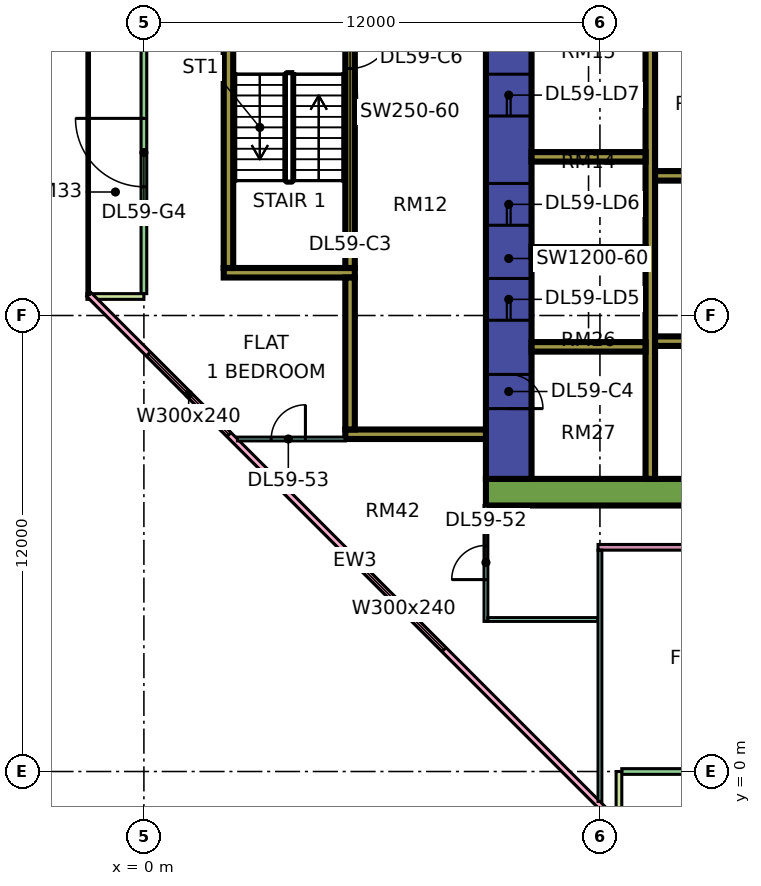
"""IFC4 building model, lengths in metres.
Left out: names, types, materials, properties, quantities, classifications, styles, units other than length and angle.
Written with IfcOpenShell. Run it as: python <this file> out.ifc"""

import sys

from ifc_helpers import new_model, si_unit, direction, frame, frame_2d, origin, place, context, subcontext, project, spatial, rectangle, extrude, element, fill, save


model = new_model("IFC4")
c1 = context("Model", 3, precision=1e-05, world=origin(), true_north=direction((0.0, 1.0)))
c2 = subcontext(c1, "Body", "Model", "MODEL_VIEW")
j1 = project(units=[si_unit("LENGTHUNIT", "METRE"), si_unit("PLANEANGLEUNIT", "RADIAN")], contexts=[c1])
p1 = place(None, origin())
s1 = spatial("IfcSite", under=j1, at=p1, CompositionType="ELEMENT")
p2 = place(p1, origin())
s2 = spatial("IfcBuilding", under=s1, at=p2, CompositionType="ELEMENT")
p3 = place(p2, frame((0.0, 0.0, 249.15)))
s3 = spatial("IfcBuildingStorey", under=s2, at=p3, CompositionType="ELEMENT", Elevation=249.15)
p4 = place(p3, frame((9.0, 7.35, 0.0), z_axis=(0.0, 0.0, 1.0), x_axis=(1.0, 0.0, 0.0)))
e1 = element("IfcWall", 1, at=p4, inside=s3, PredefinedType="SHEAR", context=c2, shape_type="SweptSolid", body=[
    extrude(rectangle(XDim=25.0, YDim=0.7, at=frame_2d((12.5, 0.0))), origin(), (0.0, 0.0, 1.0), 3.75),
])
p5 = place(p3, frame((9.6, 7.7, 0.0), z_axis=(0.0, 0.0, 1.0), x_axis=(0.0, 1.0, 0.0)))
e2 = element("IfcWall", 2, at=p5, inside=s3, PredefinedType="SHEAR", context=c2, shape_type="SweptSolid", body=[
    extrude(rectangle(XDim=11.6, YDim=1.2, at=frame_2d((5.8, 0.0))), origin(), (0.0, 0.0, 1.0), 3.75),
])
p6 = place(p5, frame((4.175, 0.0, 0.0)))
e3 = element("IfcOpeningElement", 3, at=p6, cuts=e2, PredefinedType="OPENING", context=c2, shape_type="SweptSolid", body=[
    extrude(rectangle(XDim=1.1, YDim=2.2, at=frame_2d((0.55, 1.1))), frame((0.0, 0.61, 0.0), z_axis=(0.0, -1.0, 0.0), x_axis=(1.0, 0.0, 0.0)), (0.0, 0.0, 1.0), 1.22),
])
p7 = place(p5, frame((6.675, 0.0, 0.0)))
e4 = element("IfcOpeningElement", 4, at=p7, cuts=e2, PredefinedType="OPENING", context=c2, shape_type="SweptSolid", body=[
    extrude(rectangle(XDim=1.1, YDim=2.2, at=frame_2d((0.55, 1.1))), frame((0.0, 0.61, 0.0), z_axis=(0.0, -1.0, 0.0), x_axis=(1.0, 0.0, 0.0)), (0.0, 0.0, 1.0), 1.22),
])
p8 = place(p5, frame((9.55, 0.0, 0.0)))
e5 = element("IfcOpeningElement", 5, at=p8, cuts=e2, PredefinedType="OPENING", context=c2, shape_type="SweptSolid", body=[
    extrude(rectangle(XDim=1.1, YDim=2.2, at=frame_2d((0.55, 1.1))), frame((0.0, 0.61, 0.0), z_axis=(0.0, -1.0, 0.0), x_axis=(1.0, 0.0, 0.0)), (0.0, 0.0, 1.0), 1.22),
])
p9 = place(p5, frame((1.85, 0.0, 0.0)))
e6 = element("IfcOpeningElement", 6, at=p9, cuts=e2, PredefinedType="OPENING", context=c2, shape_type="SweptSolid", body=[
    extrude(rectangle(XDim=0.9, YDim=2.1, at=frame_2d((0.45, 1.05))), frame((0.0, 0.61, 0.0), z_axis=(0.0, -1.0, 0.0), x_axis=(1.0, 0.0, 0.0)), (0.0, 0.0, 1.0), 1.22),
])
p10 = place(p3, frame((13.325, 7.7, 0.0), z_axis=(0.0, 0.0, 1.0), x_axis=(0.0, 1.0, 0.0)))
e7 = element("IfcWall", 7, at=p10, inside=s3, PredefinedType="SHEAR", context=c2, shape_type="SweptSolid", body=[
    extrude(rectangle(XDim=11.6, YDim=0.25, at=frame_2d((5.8, 0.0))), origin(), (0.0, 0.0, 1.0), 3.75),
])
p11 = place(p3, frame((13.45, 11.325, 0.0), z_axis=(0.0, 0.0, 1.0), x_axis=(1.0, 0.0, 0.0)))
e8 = element("IfcWall", 8, at=p11, inside=s3, PredefinedType="SHEAR", context=c2, shape_type="SweptSolid", body=[
    extrude(rectangle(XDim=19.85, YDim=0.25, at=frame_2d((9.925, 0.0))), origin(), (0.0, 0.0, 1.0), 3.75),
])
p12 = place(p11, frame((11.65, 0.0, 0.0)))
e9 = element("IfcOpeningElement", 9, at=p12, cuts=e8, PredefinedType="OPENING", context=c2, shape_type="SweptSolid", body=[
    extrude(rectangle(XDim=1.2, YDim=2.2, at=frame_2d((0.6, 1.1))), frame((0.0, 0.135, 0.0), z_axis=(0.0, -1.0, 0.0), x_axis=(1.0, 0.0, 0.0)), (0.0, 0.0, 1.0), 0.27),
])
p13 = place(p11, frame((14.4, 0.0, 0.0)))
e10 = element("IfcOpeningElement", 10, at=p13, cuts=e8, PredefinedType="OPENING", context=c2, shape_type="SweptSolid", body=[
    extrude(rectangle(XDim=1.2, YDim=2.2, at=frame_2d((0.6, 1.1))), frame((0.0, 0.135, 0.0), z_axis=(0.0, -1.0, 0.0), x_axis=(1.0, 0.0, 0.0)), (0.0, 0.0, 1.0), 0.27),
])
p14 = place(p11, frame((17.15, 0.0, 0.0)))
e11 = element("IfcOpeningElement", 11, at=p14, cuts=e8, PredefinedType="OPENING", context=c2, shape_type="SweptSolid", body=[
    extrude(rectangle(XDim=1.2, YDim=2.2, at=frame_2d((0.6, 1.1))), frame((0.0, 0.135, 0.0), z_axis=(0.0, -1.0, 0.0), x_axis=(1.0, 0.0, 0.0)), (0.0, 0.0, 1.0), 0.27),
])
p15 = place(p11, frame((2.8, 0.0, 0.0)))
e12 = element("IfcOpeningElement", 12, at=p15, cuts=e8, PredefinedType="OPENING", context=c2, shape_type="SweptSolid", body=[
    extrude(rectangle(XDim=0.9, YDim=2.1, at=frame_2d((0.45, 1.05))), frame((0.0, 0.135, 0.0), z_axis=(0.0, -1.0, 0.0), x_axis=(1.0, 0.0, 0.0)), (0.0, 0.0, 1.0), 0.27),
])
p16 = place(p11, frame((8.175, 0.0, 0.0)))
e13 = element("IfcOpeningElement", 13, at=p16, cuts=e8, PredefinedType="OPENING", context=c2, shape_type="SweptSolid", body=[
    extrude(rectangle(XDim=0.9, YDim=2.1, at=frame_2d((0.45, 1.05))), frame((0.0, 0.135, 0.0), z_axis=(0.0, -1.0, 0.0), x_axis=(1.0, 0.0, 0.0)), (0.0, 0.0, 1.0), 0.27),
])
p17 = place(p3, frame((13.45, 15.675, 0.0), z_axis=(0.0, 0.0, 1.0), x_axis=(1.0, 0.0, 0.0)))
e14 = element("IfcWall", 14, at=p17, inside=s3, PredefinedType="SHEAR", context=c2, shape_type="SweptSolid", body=[
    extrude(rectangle(XDim=13.75, YDim=0.25, at=frame_2d((6.875, 0.0))), origin(), (0.0, 0.0, 1.0), 3.75),
])
p18 = place(p17, frame((11.65, 0.0, 0.0)))
e15 = element("IfcOpeningElement", 15, at=p18, cuts=e14, PredefinedType="OPENING", context=c2, shape_type="SweptSolid", body=[
    extrude(rectangle(XDim=1.2, YDim=2.2, at=frame_2d((0.6, 1.1))), frame((0.0, 0.135, 0.0), z_axis=(0.0, -1.0, 0.0), x_axis=(1.0, 0.0, 0.0)), (0.0, 0.0, 1.0), 0.27),
])
for number, where, z_axis, x_axis in (
    (16, (10.2, 11.175, 0.0), (0.0, 0.0, 1.0), (1.0, 0.0, 0.0)),
    (17, (10.2, 13.675, 0.0), (0.0, 0.0, 1.0), (1.0, 0.0, 0.0)),
    (18, (10.2, 16.175, 0.0), (0.0, 0.0, 1.0), (1.0, 0.0, 0.0)),
):
    element("IfcWall", number, at=place(p3, frame(where, z_axis=z_axis, x_axis=x_axis)), inside=s3, PredefinedType="SHEAR", context=c2, shape_type="SweptSolid", body=[
        extrude(rectangle(XDim=3.0, YDim=0.25, at=frame_2d((1.5, 0.0))), origin(), (0.0, 0.0, 1.0), 3.75),
    ])
p19 = place(p3, frame((2.1, 13.125, 0.0), z_axis=(0.0, 0.0, 1.0), x_axis=(1.0, 0.0, 0.0)))
e19 = element("IfcWall", 19, at=p19, inside=s3, PredefinedType="SHEAR", context=c2, shape_type="SweptSolid", body=[
    extrude(rectangle(XDim=3.45, YDim=0.25, at=frame_2d((1.725, 0.0))), origin(), (0.0, 0.0, 1.0), 3.75),
])
p20 = place(p3, frame((2.225, 13.25, 0.0), z_axis=(0.0, 0.0, 1.0), x_axis=(0.0, 1.0, 0.0)))
e20 = element("IfcWall", 20, at=p20, inside=s3, PredefinedType="SHEAR", context=c2, shape_type="SweptSolid", body=[
    extrude(rectangle(XDim=6.5, YDim=0.25, at=frame_2d((3.25, 0.0))), origin(), (0.0, 0.0, 1.0), 3.75),
])
p21 = place(p3, frame((5.425, 13.25, 0.0), z_axis=(0.0, 0.0, 1.0), x_axis=(0.0, 1.0, 0.0)))
e21 = element("IfcWall", 21, at=p21, inside=s3, PredefinedType="SHEAR", context=c2, shape_type="SweptSolid", body=[
    extrude(rectangle(XDim=6.5, YDim=0.25, at=frame_2d((3.25, 0.0))), origin(), (0.0, 0.0, 1.0), 3.75),
])
p22 = place(p21, frame((5.25, 0.0, 0.0)))
e22 = element("IfcOpeningElement", 22, at=p22, cuts=e21, PredefinedType="OPENING", context=c2, shape_type="SweptSolid", body=[
    extrude(rectangle(XDim=1.1, YDim=2.2, at=frame_2d((0.55, 1.1))), frame((0.0, 0.135, 0.0), z_axis=(0.0, -1.0, 0.0), x_axis=(1.0, 0.0, 0.0)), (0.0, 0.0, 1.0), 0.27),
])
p23 = place(p3, frame((5.3, 8.875, 0.0), z_axis=(0.0, 0.0, 1.0), x_axis=(1.0, 0.0, 0.0)))
e23 = element("IfcWall", 23, at=p23, inside=s3, PredefinedType="SHEAR", context=c2, shape_type="SweptSolid", body=[
    extrude(rectangle(XDim=3.7, YDim=0.25, at=frame_2d((1.85, 0.0))), origin(), (0.0, 0.0, 1.0), 3.75),
])
p24 = place(p3, frame((5.425, 9.0, 0.0), z_axis=(0.0, 0.0, 1.0), x_axis=(0.0, 1.0, 0.0)))
e24 = element("IfcWall", 24, at=p24, inside=s3, PredefinedType="SHEAR", context=c2, shape_type="SweptSolid", body=[
    extrude(rectangle(XDim=4.0, YDim=0.25, at=frame_2d((2.0, 0.0))), origin(), (0.0, 0.0, 1.0), 3.75),
])
p25 = place(p3, frame((0.0, 23.925, 0.0), z_axis=(0.0, 0.0, 1.0), x_axis=(0.0, -1.0, 0.0)))
e25 = element("IfcWall", 25, at=p25, inside=s3, PredefinedType="SOLIDWALL", context=c2, shape_type="SweptSolid", body=[
    extrude(rectangle(XDim=11.35, YDim=0.15, at=frame_2d((5.675, 0.0))), origin(), (0.0, 0.0, 1.0), 3.35),
])
p26 = place(p25, frame((6.738, 0.0, 0.0)))
e26 = element("IfcOpeningElement", 26, at=p26, cuts=e25, PredefinedType="OPENING", context=c2, shape_type="SweptSolid", body=[
    extrude(rectangle(XDim=1.8, YDim=2.4, at=frame_2d((0.9, 1.2))), frame((0.0, 0.085, 0.0), z_axis=(0.0, -1.0, 0.0), x_axis=(1.0, 0.0, 0.0)), (0.0, 0.0, 1.0), 0.17),
])
p27 = place(p3, frame((-1.5, 12.5, 0.0), z_axis=(0.0, 0.0, 1.0), x_axis=(1.0, 0.0, 0.0)))
e27 = element("IfcWall", 27, at=p27, inside=s3, PredefinedType="SOLIDWALL", context=c2, shape_type="SweptSolid", body=[
    extrude(rectangle(XDim=1.5, YDim=0.15, at=frame_2d((0.75, 0.0))), origin(), (0.0, 0.0, 1.0), 3.35),
])
p28 = place(p3, frame((-1.447, 12.553, 0.0), z_axis=(0.0, 0.0, 1.0), x_axis=(0.707106781187, -0.707106781187, 0.0)))
e28 = element("IfcWall", 28, at=p28, inside=s3, PredefinedType="SOLIDWALL", context=c2, shape_type="SweptSolid", body=[
    extrude(rectangle(XDim=19.799, YDim=0.15, at=frame_2d((9.899, 0.0))), origin(), (0.0, 0.0, 1.0), 3.35),
])
p29 = place(p28, frame((2.212, 0.0, 0.45)))
e29 = element("IfcOpeningElement", 29, at=p29, cuts=e28, PredefinedType="OPENING", context=c2, shape_type="SweptSolid", body=[
    extrude(rectangle(XDim=3.0, YDim=2.4, at=frame_2d((1.5, 1.2))), frame((0.0, 0.085, 0.0), z_axis=(0.0, -1.0, 0.0), x_axis=(1.0, 0.0, 0.0)), (0.0, 0.0, 1.0), 0.17),
])
p30 = place(p28, frame((10.216, 0.0, 0.45)))
e30 = element("IfcOpeningElement", 30, at=p30, cuts=e28, PredefinedType="OPENING", context=c2, shape_type="SweptSolid", body=[
    extrude(rectangle(XDim=3.0, YDim=2.4, at=frame_2d((1.5, 1.2))), frame((0.0, 0.085, 0.0), z_axis=(0.0, -1.0, 0.0), x_axis=(1.0, 0.0, 0.0)), (0.0, 0.0, 1.0), 0.17),
])
p31 = place(p3, frame((12.575, 0.0, 0.0), z_axis=(0.0, 0.0, 1.0), x_axis=(1.0, 0.0, 0.0)))
e31 = element("IfcWall", 31, at=p31, inside=s3, PredefinedType="SOLIDWALL", context=c2, shape_type="SweptSolid", body=[
    extrude(rectangle(XDim=11.35, YDim=0.15, at=frame_2d((5.675, 0.0))), origin(), (0.0, 0.0, 1.0), 3.35),
])
p32 = place(p31, frame((3.312, 0.0, 0.0)))
e32 = element("IfcOpeningElement", 32, at=p32, cuts=e31, PredefinedType="OPENING", context=c2, shape_type="SweptSolid", body=[
    extrude(rectangle(XDim=1.8, YDim=2.4, at=frame_2d((0.9, 1.2))), frame((0.0, 0.085, 0.0), z_axis=(0.0, -1.0, 0.0), x_axis=(1.0, 0.0, 0.0)), (0.0, 0.0, 1.0), 0.17),
])
p33 = place(p31, frame((9.062, 0.0, 0.45)))
e33 = element("IfcOpeningElement", 33, at=p33, cuts=e31, PredefinedType="OPENING", context=c2, shape_type="SweptSolid", body=[
    extrude(rectangle(XDim=1.2, YDim=2.4, at=frame_2d((0.6, 1.2))), frame((0.0, 0.085, 0.0), z_axis=(0.0, -1.0, 0.0), x_axis=(1.0, 0.0, 0.0)), (0.0, 0.0, 1.0), 0.17),
])
p34 = place(p3, frame((12.5, -1.5, 0.0), z_axis=(0.0, 0.0, 1.0), x_axis=(0.0, 1.0, 0.0)))
e34 = element("IfcWall", 34, at=p34, inside=s3, PredefinedType="SOLIDWALL", context=c2, shape_type="SweptSolid", body=[
    extrude(rectangle(XDim=1.5, YDim=0.15, at=frame_2d((0.75, 0.0))), origin(), (0.0, 0.0, 1.0), 3.35),
])
p35 = place(p3, frame((2.461, 8.75, 0.0), z_axis=(0.0, 0.0, 1.0), x_axis=(1.0, 0.0, 0.0)))
e35 = element("IfcWall", 35, at=p35, inside=s3, PredefinedType="PARTITIONING", context=c2, shape_type="SweptSolid", body=[
    extrude(rectangle(XDim=2.839, YDim=0.1, at=frame_2d((1.419, 0.0))), origin(), (0.0, 0.0, 1.0), 3.35),
])
p36 = place(p35, frame((0.889, 0.0, 0.0)))
e36 = element("IfcOpeningElement", 36, at=p36, cuts=e35, PredefinedType="OPENING", context=c2, shape_type="SweptSolid", body=[
    extrude(rectangle(XDim=0.9, YDim=2.1, at=frame_2d((0.45, 1.05))), frame((0.0, 0.06, 0.0), z_axis=(0.0, -1.0, 0.0), x_axis=(1.0, 0.0, 0.0)), (0.0, 0.0, 1.0), 0.12),
])
p37 = place(p3, frame((9.0, 3.95, 0.0), z_axis=(0.0, 0.0, 1.0), x_axis=(0.0, 1.0, 0.0)))
e37 = element("IfcWall", 37, at=p37, inside=s3, PredefinedType="PARTITIONING", context=c2, shape_type="SweptSolid", body=[
    extrude(rectangle(XDim=3.05, YDim=0.1, at=frame_2d((1.525, 0.0))), origin(), (0.0, 0.0, 1.0), 3.35),
])
p38 = place(p37, frame((1.1, 0.0, 0.0)))
e38 = element("IfcOpeningElement", 38, at=p38, cuts=e37, PredefinedType="OPENING", context=c2, shape_type="SweptSolid", body=[
    extrude(rectangle(XDim=0.9, YDim=2.1, at=frame_2d((0.45, 1.05))), frame((0.0, 0.06, 0.0), z_axis=(0.0, -1.0, 0.0), x_axis=(1.0, 0.0, 0.0)), (0.0, 0.0, 1.0), 0.12),
])
p39 = place(p3, frame((9.05, 4.0, 0.0), z_axis=(0.0, 0.0, 1.0), x_axis=(1.0, 0.0, 0.0)))
e39 = element("IfcWall", 39, at=p39, inside=s3, PredefinedType="PARTITIONING", context=c2, shape_type="SweptSolid", body=[
    extrude(rectangle(XDim=2.9, YDim=0.1, at=frame_2d((1.45, 0.0))), origin(), (0.0, 0.0, 1.0), 3.35),
])
p40 = place(p3, frame((11.95, 5.9, 0.0), z_axis=(0.0, 0.0, 1.0), x_axis=(1.0, 0.0, 0.0)))
e40 = element("IfcWall", 40, at=p40, inside=s3, PredefinedType="PARTITIONING", context=c2, shape_type="SweptSolid", body=[
    extrude(rectangle(XDim=21.1, YDim=0.15, at=frame_2d((10.55, 0.0))), origin(), (0.0, 0.0, 1.0), 3.35),
])
p41 = place(p40, frame((10.1, 0.0, 0.0)))
e41 = element("IfcOpeningElement", 41, at=p41, cuts=e40, PredefinedType="OPENING", context=c2, shape_type="SweptSolid", body=[
    extrude(rectangle(XDim=0.9, YDim=2.1, at=frame_2d((0.45, 1.05))), frame((0.0, 0.085, 0.0), z_axis=(0.0, -1.0, 0.0), x_axis=(1.0, 0.0, 0.0)), (0.0, 0.0, 1.0), 0.17),
])
p42 = place(p40, frame((16.1, 0.0, 0.0)))
e42 = element("IfcOpeningElement", 42, at=p42, cuts=e40, PredefinedType="OPENING", context=c2, shape_type="SweptSolid", body=[
    extrude(rectangle(XDim=0.9, YDim=2.1, at=frame_2d((0.45, 1.05))), frame((0.0, 0.085, 0.0), z_axis=(0.0, -1.0, 0.0), x_axis=(1.0, 0.0, 0.0)), (0.0, 0.0, 1.0), 0.17),
])
p43 = place(p40, frame((4.1, 0.0, 0.0)))
e43 = element("IfcOpeningElement", 43, at=p43, cuts=e40, PredefinedType="OPENING", context=c2, shape_type="SweptSolid", body=[
    extrude(rectangle(XDim=0.9, YDim=2.1, at=frame_2d((0.45, 1.05))), frame((0.0, 0.085, 0.0), z_axis=(0.0, -1.0, 0.0), x_axis=(1.0, 0.0, 0.0)), (0.0, 0.0, 1.0), 0.17),
])
p44 = place(p3, frame((12.0, -0.788, 0.0), z_axis=(0.0, 0.0, 1.0), x_axis=(0.0, 1.0, 0.0)))
e44 = element("IfcWall", 44, at=p44, inside=s3, PredefinedType="PARTITIONING", context=c2, shape_type="SweptSolid", body=[
    extrude(rectangle(XDim=6.613, YDim=0.1, at=frame_2d((3.306, 0.0))), origin(), (0.0, 0.0, 1.0), 3.35),
])
p45 = place(p26, frame((1.8, 0.0, 0.0), z_axis=(0.0, 0.0, 1.0), x_axis=(-1.0, 0.0, 0.0)))
e45 = element("IfcDoor", 45, at=p45, inside=s3, OperationType="DOUBLE_DOOR_SINGLE_SWING", PredefinedType="DOOR", context=c2, shape_type="SweptSolid", body=[
    extrude(rectangle(XDim=1.8, YDim=2.4, at=frame_2d((0.9, 1.2))), frame((0.0, 0.025, 0.0), z_axis=(0.0, -1.0, 0.0), x_axis=(1.0, 0.0, 0.0)), (0.0, 0.0, 1.0), 0.05),
])
fill(e26, e45)
p46 = place(p29, origin())
e46 = element("IfcWindow", 46, at=p46, inside=s3, PartitioningType="SINGLE_PANEL", PredefinedType="WINDOW", context=c2, shape_type="SweptSolid", body=[
    extrude(rectangle(XDim=3.0, YDim=2.4, at=frame_2d((1.5, 1.2))), frame((0.0, 0.03, 0.0), z_axis=(0.0, -1.0, 0.0), x_axis=(1.0, 0.0, 0.0)), (0.0, 0.0, 1.0), 0.06),
])
fill(e29, e46)
p47 = place(p30, origin())
e47 = element("IfcWindow", 47, at=p47, inside=s3, PartitioningType="SINGLE_PANEL", PredefinedType="WINDOW", context=c2, shape_type="SweptSolid", body=[
    extrude(rectangle(XDim=3.0, YDim=2.4, at=frame_2d((1.5, 1.2))), frame((0.0, 0.03, 0.0), z_axis=(0.0, -1.0, 0.0), x_axis=(1.0, 0.0, 0.0)), (0.0, 0.0, 1.0), 0.06),
])
fill(e30, e47)
p48 = place(p6, origin())
e48 = element("IfcDoor", 48, at=p48, inside=s3, OperationType="DOUBLE_DOOR_SLIDING", PredefinedType="DOOR", context=c2, shape_type="SweptSolid", body=[
    extrude(rectangle(XDim=1.1, YDim=2.2, at=frame_2d((0.55, 1.1))), frame((0.0, 0.025, 0.0), z_axis=(0.0, -1.0, 0.0), x_axis=(1.0, 0.0, 0.0)), (0.0, 0.0, 1.0), 0.05),
])
fill(e3, e48)
p49 = place(p7, origin())
e49 = element("IfcDoor", 49, at=p49, inside=s3, OperationType="DOUBLE_DOOR_SLIDING", PredefinedType="DOOR", context=c2, shape_type="SweptSolid", body=[
    extrude(rectangle(XDim=1.1, YDim=2.2, at=frame_2d((0.55, 1.1))), frame((0.0, 0.025, 0.0), z_axis=(0.0, -1.0, 0.0), x_axis=(1.0, 0.0, 0.0)), (0.0, 0.0, 1.0), 0.05),
])
fill(e4, e49)
p50 = place(p8, origin())
e50 = element("IfcDoor", 50, at=p50, inside=s3, OperationType="DOUBLE_DOOR_SLIDING", PredefinedType="DOOR", context=c2, shape_type="SweptSolid", body=[
    extrude(rectangle(XDim=1.1, YDim=2.2, at=frame_2d((0.55, 1.1))), frame((0.0, 0.025, 0.0), z_axis=(0.0, -1.0, 0.0), x_axis=(1.0, 0.0, 0.0)), (0.0, 0.0, 1.0), 0.05),
])
fill(e5, e50)
p51 = place(p22, origin())
e51 = element("IfcDoor", 51, at=p51, inside=s3, OperationType="SINGLE_SWING_RIGHT", PredefinedType="DOOR", context=c2, shape_type="SweptSolid", body=[
    extrude(rectangle(XDim=1.1, YDim=2.2, at=frame_2d((0.55, 1.1))), frame((0.0, 0.025, 0.0), z_axis=(0.0, -1.0, 0.0), x_axis=(1.0, 0.0, 0.0)), (0.0, 0.0, 1.0), 0.05),
])
fill(e22, e51)
p52 = place(p9, frame((0.9, 0.0, 0.0), z_axis=(0.0, 0.0, 1.0), x_axis=(-1.0, 0.0, 0.0)))
e52 = element("IfcDoor", 52, at=p52, inside=s3, OperationType="SINGLE_SWING_LEFT", PredefinedType="DOOR", context=c2, shape_type="SweptSolid", body=[
    extrude(rectangle(XDim=0.9, YDim=2.1, at=frame_2d((0.45, 1.05))), frame((0.0, 0.025, 0.0), z_axis=(0.0, -1.0, 0.0), x_axis=(1.0, 0.0, 0.0)), (0.0, 0.0, 1.0), 0.05),
])
fill(e6, e52)
p53 = place(p38, origin())
e53 = element("IfcDoor", 53, at=p53, inside=s3, OperationType="SINGLE_SWING_LEFT", PredefinedType="DOOR", context=c2, shape_type="SweptSolid", body=[
    extrude(rectangle(XDim=0.9, YDim=2.1, at=frame_2d((0.45, 1.05))), frame((0.0, 0.025, 0.0), z_axis=(0.0, -1.0, 0.0), x_axis=(1.0, 0.0, 0.0)), (0.0, 0.0, 1.0), 0.05),
])
fill(e38, e53)
p54 = place(p36, frame((0.9, 0.0, 0.0), z_axis=(0.0, 0.0, 1.0), x_axis=(-1.0, 0.0, 0.0)))
e54 = element("IfcDoor", 54, at=p54, inside=s3, OperationType="SINGLE_SWING_RIGHT", PredefinedType="DOOR", context=c2, shape_type="SweptSolid", body=[
    extrude(rectangle(XDim=0.9, YDim=2.1, at=frame_2d((0.45, 1.05))), frame((0.0, 0.025, 0.0), z_axis=(0.0, -1.0, 0.0), x_axis=(1.0, 0.0, 0.0)), (0.0, 0.0, 1.0), 0.05),
])
fill(e36, e54)
save(model, sys.argv[1])
